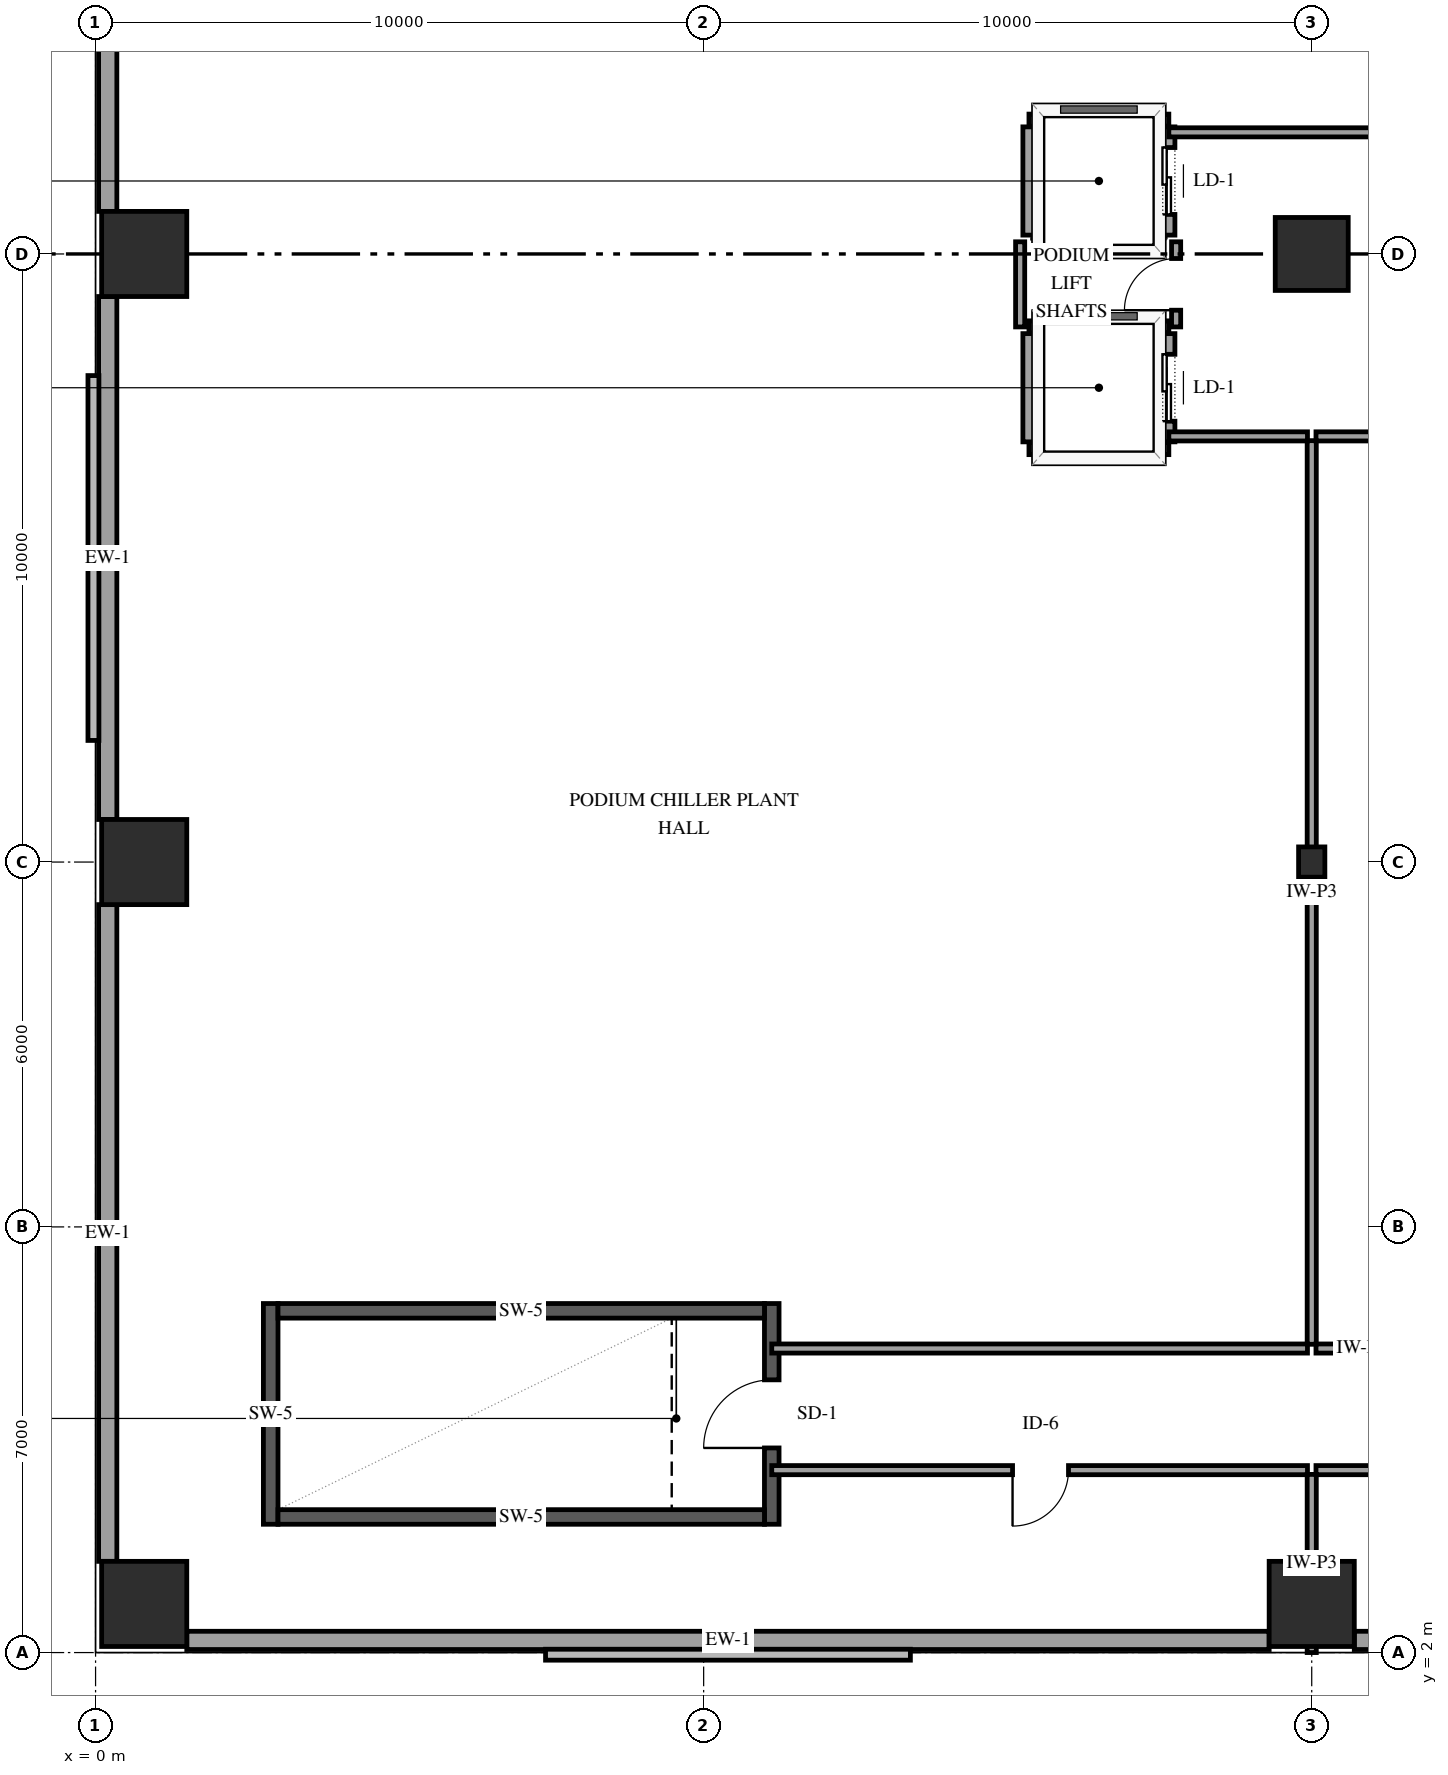
"""IFC4 building model, lengths in metres.
Left out: names, types, materials, properties, quantities, classifications, styles, units other than length and angle.
Written with IfcOpenShell. Run it as: python <this file> out.ifc"""

import sys

from ifc_helpers import new_model, si_unit, direction, frame, frame_2d, origin, origin_2d, place, context, subcontext, project, spatial, rectangle, i_section, extrude, element, fill, save


model = new_model("IFC4")
c1 = context("Model", 3, precision=1e-05, world=origin(), true_north=direction((0.0, 1.0)))
c2 = subcontext(c1, "Body", "Model", "MODEL_VIEW")
j1 = project(units=[si_unit("LENGTHUNIT", "METRE"), si_unit("PLANEANGLEUNIT", "RADIAN")], contexts=[c1])
p1 = place(None, origin())
s1 = spatial("IfcSite", under=j1, at=p1, CompositionType="ELEMENT")
p2 = place(p1, origin())
s2 = spatial("IfcBuilding", under=s1, at=p2, CompositionType="ELEMENT")
p3 = place(p2, frame((0.0, 0.0, 25.2)))
s3 = spatial("IfcBuildingStorey", under=s2, at=p3, CompositionType="ELEMENT", Elevation=25.2)
p4 = place(p3, frame((2.88, 4.11, 0.0), z_axis=(0.0, 0.0, 1.0), x_axis=(0.0, 1.0, 0.0)))
e1 = element("IfcWall", 1, at=p4, inside=s3, PredefinedType="SHEAR", context=c2, shape_type="SweptSolid", body=[
    extrude(rectangle(XDim=3.63, YDim=0.24, at=frame_2d((1.815, 0.0))), origin(), (0.0, 0.0, 1.0), 5.4),
])
p5 = place(p3, frame((11.12, 4.11, 0.0), z_axis=(0.0, 0.0, 1.0), x_axis=(0.0, 1.0, 0.0)))
e2 = element("IfcWall", 2, at=p5, inside=s3, PredefinedType="SHEAR", context=c2, shape_type="SweptSolid", body=[
    extrude(rectangle(XDim=3.63, YDim=0.24, at=frame_2d((1.815, 0.0))), origin(), (0.0, 0.0, 1.0), 5.4),
])
p6 = place(p5, frame((1.255, 0.0, 0.0)))
e3 = element("IfcOpeningElement", 3, at=p6, cuts=e2, PredefinedType="OPENING", context=c2, shape_type="SweptSolid", body=[
    extrude(rectangle(XDim=1.12, YDim=2.15, at=frame_2d((0.56, 1.075))), frame((0.0, 0.13, 0.0), z_axis=(0.0, -1.0, 0.0), x_axis=(1.0, 0.0, 0.0)), (0.0, 0.0, 1.0), 0.26),
])
for number, where, z_axis, x_axis in (
    (4, (3.0, 4.23, 0.0), (0.0, 0.0, 1.0), (1.0, 0.0, 0.0)),
    (5, (3.0, 7.62, 0.0), (0.0, 0.0, 1.0), (1.0, 0.0, 0.0)),
):
    element("IfcWall", number, at=place(p3, frame(where, z_axis=z_axis, x_axis=x_axis)), inside=s3, PredefinedType="SHEAR", context=c2, shape_type="SweptSolid", body=[
        extrude(rectangle(XDim=8.0, YDim=0.24, at=frame_2d((4.0, 0.0))), origin(), (0.0, 0.0, 1.0), 5.4),
    ])
for number, where, z_axis, x_axis in (
    (6, (0.8, 2.8, 0.0), (0.0, 0.0, 1.0), (1.0, 0.0, 0.0)),
    (7, (20.0, 2.8, 0.0), (0.0, 0.0, 1.0), (1.0, 0.0, 0.0)),
    (8, (0.8, 15.0, 0.0), (0.0, 0.0, 1.0), (1.0, 0.0, 0.0)),
):
    element("IfcColumn", number, at=place(p3, frame(where, z_axis=z_axis, x_axis=x_axis)), inside=s3, PredefinedType="COLUMN", context=c2, shape_type="SweptSolid", body=[
        extrude(rectangle(XDim=1.4, YDim=1.4, at=origin_2d()), origin(), (0.0, 0.0, 1.0), 5.1),
    ])
p7 = place(p3, frame((20.0, 15.0, 0.0), z_axis=(0.0, 0.0, 1.0), x_axis=(1.0, 0.0, 0.0)))
e9 = element("IfcColumn", 9, at=p7, inside=s3, PredefinedType="COLUMN", context=c2, shape_type="SweptSolid", body=[
    extrude(i_section(OverallWidth=0.432, OverallDepth=0.498, WebThickness=0.056, FlangeThickness=0.089, FilletRadius=0.038, at=origin_2d()), origin(), (0.0, 0.0, 1.0), 5.1),
])
p8 = place(p3, frame((0.8, 25.0, 0.0), z_axis=(0.0, 0.0, 1.0), x_axis=(1.0, 0.0, 0.0)))
e10 = element("IfcColumn", 10, at=p8, inside=s3, PredefinedType="COLUMN", context=c2, shape_type="SweptSolid", body=[
    extrude(rectangle(XDim=1.4, YDim=1.4, at=origin_2d()), origin(), (0.0, 0.0, 1.0), 5.1),
])
p9 = place(p3, frame((20.0, 25.0, 0.0), z_axis=(0.0, 0.0, 1.0), x_axis=(1.0, 0.0, 0.0)))
e11 = element("IfcColumn", 11, at=p9, inside=s3, PredefinedType="COLUMN", context=c2, shape_type="SweptSolid", body=[
    extrude(rectangle(XDim=1.2, YDim=1.2, at=origin_2d()), origin(), (0.0, 0.0, 1.0), 5.1),
])
p10 = place(p3, frame((19.3, 2.2, 0.0), z_axis=(0.0, 0.0, 1.0), x_axis=(-1.0, 0.0, 0.0)))
e12 = element("IfcWall", 12, at=p10, inside=s3, PredefinedType="SOLIDWALL", context=c2, shape_type="SweptSolid", body=[
    extrude(rectangle(XDim=17.8, YDim=0.3, at=frame_2d((8.9, 0.0))), origin(), (0.0, 0.0, 1.0), 4.156),
])
p11 = place(p3, frame((31.9, 2.2, 0.0), z_axis=(0.0, 0.0, 1.0), x_axis=(-1.0, 0.0, 0.0)))
e13 = element("IfcWall", 13, at=p11, inside=s3, PredefinedType="SOLIDWALL", context=c2, shape_type="SweptSolid", body=[
    extrude(rectangle(XDim=11.2, YDim=0.3, at=frame_2d((5.6, 0.0))), origin(), (0.0, 0.0, 1.0), 4.156),
])
p12 = place(p3, frame((0.2, 3.5, 0.0), z_axis=(0.0, 0.0, 1.0), x_axis=(0.0, 1.0, 0.0)))
e14 = element("IfcWall", 14, at=p12, inside=s3, PredefinedType="SOLIDWALL", context=c2, shape_type="SweptSolid", body=[
    extrude(rectangle(XDim=10.8, YDim=0.3, at=frame_2d((5.4, 0.0))), origin(), (0.0, 0.0, 1.0), 4.156),
])
for number, where, z_axis, x_axis in (
    (15, (0.2, 15.7, 0.0), (0.0, 0.0, 1.0), (0.0, 1.0, 0.0)),
    (16, (0.2, 25.7, 0.0), (0.0, 0.0, 1.0), (0.0, 1.0, 0.0)),
):
    element("IfcWall", number, at=place(p3, frame(where, z_axis=z_axis, x_axis=x_axis)), inside=s3, PredefinedType="SOLIDWALL", context=c2, shape_type="SweptSolid", body=[
        extrude(rectangle(XDim=8.6, YDim=0.3, at=frame_2d((4.3, 0.0))), origin(), (0.0, 0.0, 1.0), 4.156),
    ])
for number, where, z_axis, x_axis in (
    (17, (15.35, 21.8, 0.0), (0.0, 0.0, 1.0), (1.0, 0.0, 0.0)),
    (18, (15.35, 23.8, 0.0), (0.0, 0.0, 1.0), (1.0, 0.0, 0.0)),
):
    element("IfcWall", number, at=place(p3, frame(where, z_axis=z_axis, x_axis=x_axis)), inside=s3, PredefinedType="SOLIDWALL", context=c2, shape_type="SweptSolid", body=[
        extrude(rectangle(XDim=2.3, YDim=0.2, at=frame_2d((1.15, 0.0))), origin(), (0.0, 0.0, 1.0), 5.1),
    ])
p13 = place(p3, frame((15.35, 21.91, 0.0), z_axis=(0.0, 0.0, 1.0), x_axis=(0.0, 1.0, 0.0)))
e19 = element("IfcWall", 19, at=p13, inside=s3, PredefinedType="SOLIDWALL", context=c2, shape_type="SweptSolid", body=[
    extrude(rectangle(XDim=1.78, YDim=0.2, at=frame_2d((0.89, 0.0))), origin(), (0.0, 0.0, 1.0), 5.1),
])
p14 = place(p3, frame((17.65, 21.91, 0.0), z_axis=(0.0, 0.0, 1.0), x_axis=(0.0, 1.0, 0.0)))
e20 = element("IfcWall", 20, at=p14, inside=s3, PredefinedType="SOLIDWALL", context=c2, shape_type="SweptSolid", body=[
    extrude(rectangle(XDim=1.78, YDim=0.2, at=frame_2d((0.89, 0.0))), origin(), (0.0, 0.0, 1.0), 5.1),
])
p15 = place(p14, frame((0.34, 0.0, 0.0)))
e21 = element("IfcOpeningElement", 21, at=p15, cuts=e20, PredefinedType="OPENING", context=c2, shape_type="SweptSolid", body=[
    extrude(rectangle(XDim=1.1, YDim=2.15, at=frame_2d((0.55, 1.075))), frame((0.0, 0.11, 0.0), z_axis=(0.0, -1.0, 0.0), x_axis=(1.0, 0.0, 0.0)), (0.0, 0.0, 1.0), 0.22),
])
p16 = place(p3, frame((15.35, 27.2, 0.0), z_axis=(0.0, 0.0, 1.0), x_axis=(1.0, 0.0, 0.0)))
e22 = element("IfcWall", 22, at=p16, inside=s3, PredefinedType="SOLIDWALL", context=c2, shape_type="SweptSolid", body=[
    extrude(rectangle(XDim=2.3, YDim=0.2, at=frame_2d((1.15, 0.0))), origin(), (0.0, 0.0, 1.0), 5.1),
])
p17 = place(p3, frame((15.35, 25.31, 0.0), z_axis=(0.0, 0.0, 1.0), x_axis=(0.0, 1.0, 0.0)))
e23 = element("IfcWall", 23, at=p17, inside=s3, PredefinedType="SOLIDWALL", context=c2, shape_type="SweptSolid", body=[
    extrude(rectangle(XDim=1.78, YDim=0.2, at=frame_2d((0.89, 0.0))), origin(), (0.0, 0.0, 1.0), 5.1),
])
p18 = place(p3, frame((17.65, 25.31, 0.0), z_axis=(0.0, 0.0, 1.0), x_axis=(0.0, 1.0, 0.0)))
e24 = element("IfcWall", 24, at=p18, inside=s3, PredefinedType="SOLIDWALL", context=c2, shape_type="SweptSolid", body=[
    extrude(rectangle(XDim=1.78, YDim=0.2, at=frame_2d((0.89, 0.0))), origin(), (0.0, 0.0, 1.0), 5.1),
])
p19 = place(p18, frame((0.34, 0.0, 0.0)))
e25 = element("IfcOpeningElement", 25, at=p19, cuts=e24, PredefinedType="OPENING", context=c2, shape_type="SweptSolid", body=[
    extrude(rectangle(XDim=1.1, YDim=2.15, at=frame_2d((0.55, 1.075))), frame((0.0, 0.11, 0.0), z_axis=(0.0, -1.0, 0.0), x_axis=(1.0, 0.0, 0.0)), (0.0, 0.0, 1.0), 0.22),
])
p20 = place(p3, frame((46.73, 5.0, 0.0), z_axis=(0.0, 0.0, 1.0), x_axis=(-1.0, 0.0, 0.0)))
e26 = element("IfcWall", 26, at=p20, inside=s3, PredefinedType="PARTITIONING", context=c2, shape_type="SweptSolid", body=[
    extrude(rectangle(XDim=26.66, YDim=0.15, at=frame_2d((13.33, 0.0))), origin(), (0.0, 0.0, 1.0), 5.1),
])
p21 = place(p20, frame((12.855, 0.0, 0.0)))
e27 = element("IfcOpeningElement", 27, at=p21, cuts=e26, PredefinedType="OPENING", context=c2, shape_type="SweptSolid", body=[
    extrude(rectangle(XDim=0.92, YDim=2.12, at=frame_2d((0.46, 1.06))), frame((0.0, 0.085, 0.0), z_axis=(0.0, -1.0, 0.0), x_axis=(1.0, 0.0, 0.0)), (0.0, 0.0, 1.0), 0.17),
])
p22 = place(p3, frame((20.0, 21.93, 0.0), z_axis=(0.0, 0.0, 1.0), x_axis=(0.0, -1.0, 0.0)))
e28 = element("IfcWall", 28, at=p22, inside=s3, PredefinedType="PARTITIONING", context=c2, shape_type="SweptSolid", body=[
    extrude(rectangle(XDim=14.86, YDim=0.15, at=frame_2d((7.43, 0.0))), origin(), (0.0, 0.0, 1.0), 4.222),
])
p23 = place(p3, frame((20.07, 7.0, 0.0), z_axis=(0.0, 0.0, 1.0), x_axis=(1.0, 0.0, 0.0)))
e29 = element("IfcWall", 29, at=p23, inside=s3, PredefinedType="PARTITIONING", context=c2, shape_type="SweptSolid", body=[
    extrude(rectangle(XDim=10.46, YDim=0.15, at=frame_2d((5.23, 0.0))), origin(), (0.0, 0.0, 1.0), 5.1),
])
p24 = place(p3, frame((19.93, 5.0, 0.0), z_axis=(0.0, 0.0, 1.0), x_axis=(-1.0, 0.0, 0.0)))
e30 = element("IfcWall", 30, at=p24, inside=s3, PredefinedType="PARTITIONING", context=c2, shape_type="SweptSolid", body=[
    extrude(rectangle(XDim=8.81, YDim=0.15, at=frame_2d((4.405, 0.0))), origin(), (0.0, 0.0, 1.0), 5.1),
])
p25 = place(p24, frame((3.93, 0.0, 0.0)))
e31 = element("IfcOpeningElement", 31, at=p25, cuts=e30, PredefinedType="OPENING", context=c2, shape_type="SweptSolid", body=[
    extrude(rectangle(XDim=0.92, YDim=2.12, at=frame_2d((0.46, 1.06))), frame((0.0, 0.085, 0.0), z_axis=(0.0, -1.0, 0.0), x_axis=(1.0, 0.0, 0.0)), (0.0, 0.0, 1.0), 0.17),
])
p26 = place(p3, frame((11.12, 7.0, 0.0), z_axis=(0.0, 0.0, 1.0), x_axis=(1.0, 0.0, 0.0)))
e32 = element("IfcWall", 32, at=p26, inside=s3, PredefinedType="PARTITIONING", context=c2, shape_type="SweptSolid", body=[
    extrude(rectangle(XDim=8.81, YDim=0.15, at=frame_2d((4.405, 0.0))), origin(), (0.0, 0.0, 1.0), 5.1),
])
p27 = place(p3, frame((20.0, 2.0, 0.0), z_axis=(0.0, 0.0, 1.0), x_axis=(0.0, 1.0, 0.0)))
e33 = element("IfcWall", 33, at=p27, inside=s3, PredefinedType="PARTITIONING", context=c2, shape_type="SweptSolid", body=[
    extrude(rectangle(XDim=2.93, YDim=0.15, at=frame_2d((1.465, 0.0))), origin(), (0.0, 0.0, 1.0), 4.222),
])
p28 = place(p3, frame((19.93, 22.0, 0.0), z_axis=(0.0, 0.0, 1.0), x_axis=(-1.0, 0.0, 0.0)))
e34 = element("IfcWall", 34, at=p28, inside=s3, PredefinedType="PARTITIONING", context=c2, shape_type="SweptSolid", body=[
    extrude(rectangle(XDim=2.28, YDim=0.15, at=frame_2d((1.14, 0.0))), origin(), (0.0, 0.0, 1.0), 5.1),
])
p29 = place(p3, frame((17.77, 23.8, 0.0), z_axis=(0.0, 0.0, 1.0), x_axis=(0.0, 1.0, 0.0)))
e35 = element("IfcWall", 35, at=p29, inside=s3, PredefinedType="PARTITIONING", context=c2, shape_type="SweptSolid", body=[
    extrude(rectangle(XDim=1.4, YDim=0.15, at=frame_2d((0.7, 0.0))), origin(), (0.0, 0.0, 1.0), 5.1),
])
p30 = place(p29, frame((0.275, 0.0, 0.0)))
e36 = element("IfcOpeningElement", 36, at=p30, cuts=e35, PredefinedType="OPENING", context=c2, shape_type="SweptSolid", body=[
    extrude(rectangle(XDim=0.85, YDim=2.1, at=frame_2d((0.425, 1.05))), frame((0.0, 0.085, 0.0), z_axis=(0.0, -1.0, 0.0), x_axis=(1.0, 0.0, 0.0)), (0.0, 0.0, 1.0), 0.17),
])
p31 = place(p3, frame((15.205, 23.8, 0.0), z_axis=(0.0, 0.0, 1.0), x_axis=(0.0, 1.0, 0.0)))
e37 = element("IfcWall", 37, at=p31, inside=s3, PredefinedType="PARTITIONING", context=c2, shape_type="SweptSolid", body=[
    extrude(rectangle(XDim=1.4, YDim=0.15, at=frame_2d((0.7, 0.0))), origin(), (0.0, 0.0, 1.0), 5.1),
])
p32 = place(p3, frame((17.65, 27.0, 0.0), z_axis=(0.0, 0.0, 1.0), x_axis=(1.0, 0.0, 0.0)))
e38 = element("IfcWall", 38, at=p32, inside=s3, PredefinedType="PARTITIONING", context=c2, shape_type="SweptSolid", body=[
    extrude(rectangle(XDim=11.337, YDim=0.15, at=frame_2d((5.668, 0.0))), origin(), (0.0, 0.0, 1.0), 5.1),
])
p33 = place(p32, frame((5.244, 0.0, 0.0)))
e39 = element("IfcOpeningElement", 39, at=p33, cuts=e38, PredefinedType="OPENING", context=c2, shape_type="SweptSolid", body=[
    extrude(rectangle(XDim=0.85, YDim=2.1, at=frame_2d((0.425, 1.05))), frame((0.0, 0.085, 0.0), z_axis=(0.0, -1.0, 0.0), x_axis=(1.0, 0.0, 0.0)), (0.0, 0.0, 1.0), 0.17),
])
p34 = place(p3, frame((26.884, 22.0, 0.0), z_axis=(0.0, 0.0, 1.0), x_axis=(-1.0, 0.0, 0.0)))
e40 = element("IfcWall", 40, at=p34, inside=s3, PredefinedType="PARTITIONING", context=c2, shape_type="SweptSolid", body=[
    extrude(rectangle(XDim=6.814, YDim=0.15, at=frame_2d((3.407, 0.0))), origin(), (0.0, 0.0, 1.0), 5.1),
])
p35 = place(p15, origin())
e41 = element("IfcDoor", 41, at=p35, inside=s3, OperationType="SLIDING_TO_LEFT", PredefinedType="DOOR", context=c2, shape_type="SweptSolid", body=[
    extrude(rectangle(XDim=1.1, YDim=2.15, at=frame_2d((0.55, 1.075))), frame((0.0, 0.025, 0.0), z_axis=(0.0, -1.0, 0.0), x_axis=(1.0, 0.0, 0.0)), (0.0, 0.0, 1.0), 0.05),
])
fill(e21, e41)
p36 = place(p19, origin())
e42 = element("IfcDoor", 42, at=p36, inside=s3, OperationType="SLIDING_TO_LEFT", PredefinedType="DOOR", context=c2, shape_type="SweptSolid", body=[
    extrude(rectangle(XDim=1.1, YDim=2.15, at=frame_2d((0.55, 1.075))), frame((0.0, 0.025, 0.0), z_axis=(0.0, -1.0, 0.0), x_axis=(1.0, 0.0, 0.0)), (0.0, 0.0, 1.0), 0.05),
])
fill(e25, e42)
p37 = place(p6, origin())
e43 = element("IfcDoor", 43, at=p37, inside=s3, OperationType="SINGLE_SWING_LEFT", PredefinedType="DOOR", context=c2, shape_type="SweptSolid", body=[
    extrude(rectangle(XDim=1.12, YDim=2.15, at=frame_2d((0.56, 1.075))), frame((0.0, 0.025, 0.0), z_axis=(0.0, -1.0, 0.0), x_axis=(1.0, 0.0, 0.0)), (0.0, 0.0, 1.0), 0.05),
])
fill(e3, e43)
p38 = place(p25, origin())
e44 = element("IfcDoor", 44, at=p38, inside=s3, OperationType="SINGLE_SWING_RIGHT", PredefinedType="DOOR", context=c2, shape_type="SweptSolid", body=[
    extrude(rectangle(XDim=0.92, YDim=2.12, at=frame_2d((0.46, 1.06))), frame((0.0, 0.025, 0.0), z_axis=(0.0, -1.0, 0.0), x_axis=(1.0, 0.0, 0.0)), (0.0, 0.0, 1.0), 0.05),
])
fill(e31, e44)
p39 = place(p30, origin())
e45 = element("IfcDoor", 45, at=p39, inside=s3, OperationType="SINGLE_SWING_LEFT", PredefinedType="DOOR", context=c2, shape_type="SweptSolid", body=[
    extrude(rectangle(XDim=0.85, YDim=2.1, at=frame_2d((0.425, 1.05))), frame((0.0, 0.025, 0.0), z_axis=(0.0, -1.0, 0.0), x_axis=(1.0, 0.0, 0.0)), (0.0, 0.0, 1.0), 0.05),
])
fill(e36, e45)
save(model, sys.argv[1])
